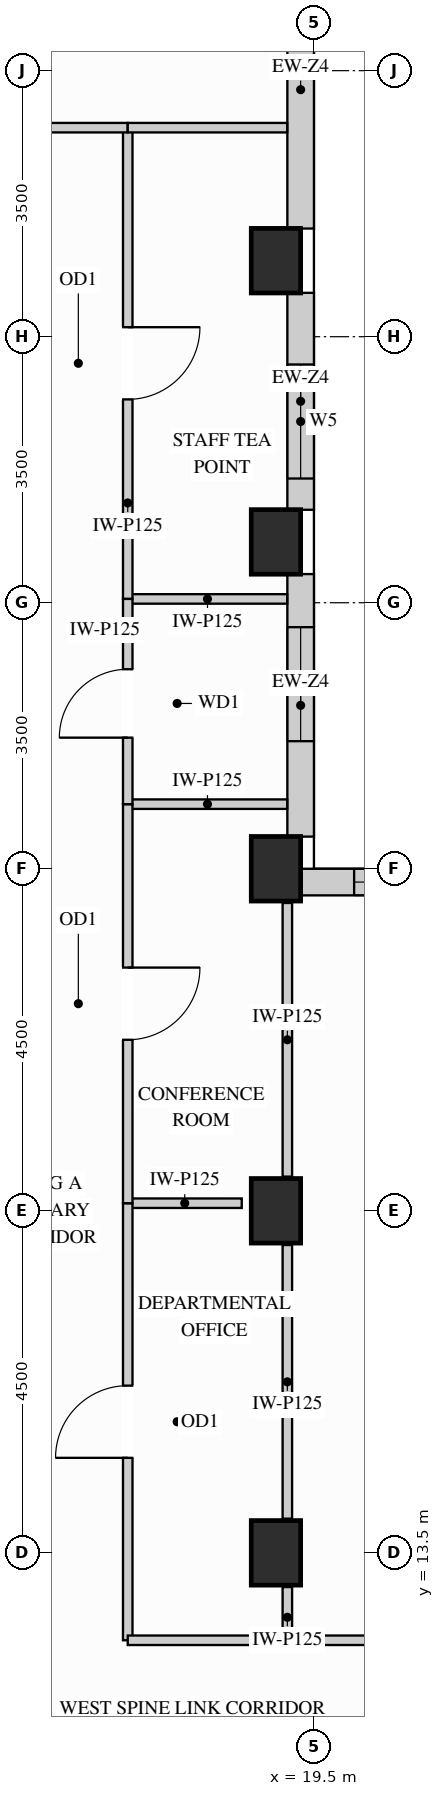
"""IFC4 building model, lengths in metres.
Left out: names, types, materials, properties, quantities, classifications, styles, units other than length and angle.
Written with IfcOpenShell. Run it as: python <this file> out.ifc"""

import sys

from ifc_helpers import new_model, si_unit, direction, frame, frame_2d, origin, origin_2d, place, context, subcontext, project, spatial, rectangle, extrude, source, transform, mapped, element, fill, save


model = new_model("IFC4")
c1 = context("Model", 3, precision=1e-05, world=origin(), true_north=direction((0.0, 1.0)))
c2 = subcontext(c1, "Body", "Model", "MODEL_VIEW")
j1 = project(units=[si_unit("LENGTHUNIT", "METRE"), si_unit("PLANEANGLEUNIT", "RADIAN")], contexts=[c1])
p1 = place(None, origin())
s1 = spatial("IfcSite", under=j1, at=p1, CompositionType="ELEMENT")
p2 = place(p1, origin())
s2 = spatial("IfcBuilding", under=s1, at=p2, CompositionType="ELEMENT")
p3 = place(p2, frame((0.0, 0.0, 259.2)))
s3 = spatial("IfcBuildingStorey", under=s2, at=p3, CompositionType="ELEMENT", Elevation=259.2)
m1 = source(origin(), c2, "Body", "SweptSolid", [
    extrude(rectangle(XDim=0.65, YDim=0.85, at=origin_2d()), origin(), (0.0, 0.0, 1.0), 3.4),
])
for number, where, z_axis, x_axis in (
    (1, (19.0, 13.5, 0.0), (0.0, 0.0, 1.0), (1.0, 0.0, 0.0)),
    (2, (19.0, 18.0, 0.0), (0.0, 0.0, 1.0), (1.0, 0.0, 0.0)),
    (3, (19.0, 22.5, 0.0), (0.0, 0.0, 1.0), (1.0, 0.0, 0.0)),
    (4, (19.0, 26.8, 0.0), (0.0, 0.0, 1.0), (1.0, 0.0, 0.0)),
    (5, (19.0, 30.5, 0.0), (0.0, 0.0, 1.0), (1.0, 0.0, 0.0)),
):
    element("IfcColumn", number, at=place(p3, frame(where, z_axis=z_axis, x_axis=x_axis)), inside=s3, PredefinedType="COLUMN", context=c2, shape_type="MappedRepresentation", body=[
        mapped(m1, transform((0.0, 0.0, 0.0), x_axis=(1.0, 0.0, 0.0), y_axis=(0.0, 1.0, 0.0), z_axis=(0.0, 0.0, 1.0))),
    ])
p4 = place(p3, frame((34.4, 22.325, 0.0), z_axis=(0.0, 0.0, 1.0), x_axis=(-1.0, 0.0, 0.0)))
e6 = element("IfcWall", 6, at=p4, inside=s3, PredefinedType="SOLIDWALL", context=c2, shape_type="SweptSolid", body=[
    extrude(rectangle(XDim=15.077, YDim=0.35, at=frame_2d((7.539, 0.0))), origin(), (0.0, 0.0, 1.0), 3.385),
])
p5 = place(p4, frame((0.647, 0.0, 0.78)))
e7 = element("IfcOpeningElement", 7, at=p5, cuts=e6, PredefinedType="OPENING", context=c2, shape_type="SweptSolid", body=[
    extrude(rectangle(XDim=1.5, YDim=2.0, at=frame_2d((0.75, 1.0))), frame((0.0, 0.185, 0.0), z_axis=(0.0, -1.0, 0.0), x_axis=(1.0, 0.0, 0.0)), (0.0, 0.0, 1.0), 0.37),
])
p6 = place(p4, frame((2.473, 0.0, 0.78)))
e8 = element("IfcOpeningElement", 8, at=p6, cuts=e6, PredefinedType="OPENING", context=c2, shape_type="SweptSolid", body=[
    extrude(rectangle(XDim=1.5, YDim=2.0, at=frame_2d((0.75, 1.0))), frame((0.0, 0.185, 0.0), z_axis=(0.0, -1.0, 0.0), x_axis=(1.0, 0.0, 0.0)), (0.0, 0.0, 1.0), 0.37),
])
p7 = place(p4, frame((5.567, 0.0, 0.78)))
e9 = element("IfcOpeningElement", 9, at=p7, cuts=e6, PredefinedType="OPENING", context=c2, shape_type="SweptSolid", body=[
    extrude(rectangle(XDim=1.5, YDim=2.0, at=frame_2d((0.75, 1.0))), frame((0.0, 0.185, 0.0), z_axis=(0.0, -1.0, 0.0), x_axis=(1.0, 0.0, 0.0)), (0.0, 0.0, 1.0), 0.37),
])
p8 = place(p4, frame((7.833, 0.0, 0.78)))
e10 = element("IfcOpeningElement", 10, at=p8, cuts=e6, PredefinedType="OPENING", context=c2, shape_type="SweptSolid", body=[
    extrude(rectangle(XDim=1.5, YDim=2.0, at=frame_2d((0.75, 1.0))), frame((0.0, 0.185, 0.0), z_axis=(0.0, -1.0, 0.0), x_axis=(1.0, 0.0, 0.0)), (0.0, 0.0, 1.0), 0.37),
])
p9 = place(p4, frame((10.986, 0.0, 0.78)))
e11 = element("IfcOpeningElement", 11, at=p9, cuts=e6, PredefinedType="OPENING", context=c2, shape_type="SweptSolid", body=[
    extrude(rectangle(XDim=1.5, YDim=2.0, at=frame_2d((0.75, 1.0))), frame((0.0, 0.185, 0.0), z_axis=(0.0, -1.0, 0.0), x_axis=(1.0, 0.0, 0.0)), (0.0, 0.0, 1.0), 0.37),
])
p10 = place(p4, frame((12.871, 0.0, 0.78)))
e12 = element("IfcOpeningElement", 12, at=p10, cuts=e6, PredefinedType="OPENING", context=c2, shape_type="SweptSolid", body=[
    extrude(rectangle(XDim=1.5, YDim=2.0, at=frame_2d((0.75, 1.0))), frame((0.0, 0.185, 0.0), z_axis=(0.0, -1.0, 0.0), x_axis=(1.0, 0.0, 0.0)), (0.0, 0.0, 1.0), 0.37),
])
p11 = place(p3, frame((19.325, 22.923, 0.0), z_axis=(0.0, 0.0, 1.0), x_axis=(0.0, 1.0, 0.0)))
e13 = element("IfcWall", 13, at=p11, inside=s3, PredefinedType="SOLIDWALL", context=c2, shape_type="SweptSolid", body=[
    extrude(rectangle(XDim=3.454, YDim=0.35, at=frame_2d((1.727, 0.0))), origin(), (0.0, 0.0, 1.0), 2.619),
])
p12 = place(p11, frame((1.256, 0.0, 0.78)))
e14 = element("IfcOpeningElement", 14, at=p12, cuts=e13, PredefinedType="OPENING", context=c2, shape_type="SweptSolid", body=[
    extrude(rectangle(XDim=1.5, YDim=1.659, at=frame_2d((0.75, 0.83))), frame((0.0, 0.185, 0.0), z_axis=(0.0, -1.0, 0.0), x_axis=(1.0, 0.0, 0.0)), (0.0, 0.0, 1.0), 0.37),
])
p13 = place(p3, frame((19.325, 27.223, 0.0), z_axis=(0.0, 0.0, 1.0), x_axis=(0.0, 1.0, 0.0)))
e15 = element("IfcWall", 15, at=p13, inside=s3, PredefinedType="SOLIDWALL", context=c2, shape_type="SweptSolid", body=[
    extrude(rectangle(XDim=2.854, YDim=0.35, at=frame_2d((1.427, 0.0))), origin(), (0.0, 0.0, 1.0), 2.619),
])
p14 = place(p13, frame((0.411, 0.0, 0.78)))
e16 = element("IfcOpeningElement", 16, at=p14, cuts=e15, PredefinedType="OPENING", context=c2, shape_type="SweptSolid", body=[
    extrude(rectangle(XDim=1.5, YDim=1.659, at=frame_2d((0.75, 0.83))), frame((0.0, 0.185, 0.0), z_axis=(0.0, -1.0, 0.0), x_axis=(1.0, 0.0, 0.0)), (0.0, 0.0, 1.0), 0.37),
])
m2 = source(origin(), c2, "Body", "SweptSolid", [
    extrude(rectangle(XDim=3.654, YDim=0.35, at=frame_2d((1.827, 0.0))), origin(), (0.0, 0.0, 1.0), 2.619),
])
p15 = place(p3, frame((19.325, 30.923, 0.0), z_axis=(0.0, 0.0, 1.0), x_axis=(0.0, 1.0, 0.0)))
e17 = element("IfcWall", 17, at=p15, inside=s3, PredefinedType="SOLIDWALL", context=c2, shape_type="MappedRepresentation", body=[
    mapped(m2, transform((0.0, 0.0, 0.0), x_axis=(1.0, 0.0, 0.0), y_axis=(0.0, 1.0, 0.0), z_axis=(0.0, 0.0, 1.0))),
])
m3 = source(origin(), c2, "Body", "SweptSolid", [
    extrude(rectangle(XDim=1.5, YDim=0.125, at=frame_2d((0.75, 0.0))), origin(), (0.0, 0.0, 1.0), 2.773),
])
p16 = place(p3, frame((17.05, 18.1, 0.0), z_axis=(0.0, 0.0, 1.0), x_axis=(1.0, 0.0, 0.0)))
e18 = element("IfcWall", 18, at=p16, inside=s3, PredefinedType="PARTITIONING", context=c2, shape_type="MappedRepresentation", body=[
    mapped(m3, transform((0.0, 0.0, 0.0), x_axis=(1.0, 0.0, 0.0), y_axis=(0.0, 1.0, 0.0), z_axis=(0.0, 0.0, 1.0))),
])
m4 = source(origin(), c2, "Body", "SweptSolid", [
    extrude(rectangle(XDim=2.098, YDim=0.125, at=frame_2d((1.049, 0.0))), origin(), (0.0, 0.0, 1.0), 3.385),
])
for number, where, z_axis, x_axis in (
    (19, (17.05, 23.35, 0.0), (0.0, 0.0, 1.0), (1.0, 0.0, 0.0)),
    (20, (17.05, 26.05, 0.0), (0.0, 0.0, 1.0), (1.0, 0.0, 0.0)),
):
    element("IfcWall", number, at=place(p3, frame(where, z_axis=z_axis, x_axis=x_axis)), inside=s3, PredefinedType="PARTITIONING", context=c2, shape_type="MappedRepresentation", body=[
        mapped(m4, transform((0.0, 0.0, 0.0), x_axis=(1.0, 0.0, 0.0), y_axis=(0.0, 1.0, 0.0), z_axis=(0.0, 0.0, 1.0))),
    ])
m5 = source(origin(), c2, "Body", "SweptSolid", [
    extrude(rectangle(XDim=0.7, YDim=0.125, at=frame_2d((0.35, 0.0))), origin(), (0.0, 0.0, 1.0), 2.773),
])
p17 = place(p3, frame((19.15, 12.35, 0.0), z_axis=(0.0, 0.0, 1.0), x_axis=(0.0, 1.0, 0.0)))
e21 = element("IfcWall", 21, at=p17, inside=s3, PredefinedType="PARTITIONING", context=c2, shape_type="MappedRepresentation", body=[
    mapped(m5, transform((0.0, 0.0, 0.0), x_axis=(1.0, 0.0, 0.0), y_axis=(0.0, 1.0, 0.0), z_axis=(0.0, 0.0, 1.0))),
])
m6 = source(origin(), c2, "Body", "SweptSolid", [
    extrude(rectangle(XDim=3.6, YDim=0.125, at=frame_2d((1.8, 0.0))), origin(), (0.0, 0.0, 1.0), 2.773),
])
for number, where, z_axis, x_axis in (
    (22, (19.15, 13.95, 0.0), (0.0, 0.0, 1.0), (0.0, 1.0, 0.0)),
    (23, (19.15, 18.45, 0.0), (0.0, 0.0, 1.0), (0.0, 1.0, 0.0)),
):
    element("IfcWall", number, at=place(p3, frame(where, z_axis=z_axis, x_axis=x_axis)), inside=s3, PredefinedType="PARTITIONING", context=c2, shape_type="MappedRepresentation", body=[
        mapped(m6, transform((0.0, 0.0, 0.0), x_axis=(1.0, 0.0, 0.0), y_axis=(0.0, 1.0, 0.0), z_axis=(0.0, 0.0, 1.0))),
    ])
p18 = place(p3, frame((17.05, 12.35, 0.0), z_axis=(0.0, 0.0, 1.0), x_axis=(0.0, 1.0, 0.0)))
e24 = element("IfcWall", 24, at=p18, inside=s3, PredefinedType="PARTITIONING", context=c2, shape_type="SweptSolid", body=[
    extrude(rectangle(XDim=5.75, YDim=0.125, at=frame_2d((2.875, 0.0))), origin(), (0.0, 0.0, 1.0), 3.385),
])
p19 = place(p18, frame((2.4, 0.0, 0.0)))
e25 = element("IfcOpeningElement", 25, at=p19, cuts=e24, PredefinedType="OPENING", context=c2, shape_type="SweptSolid", body=[
    extrude(rectangle(XDim=0.95, YDim=2.15, at=frame_2d((0.475, 1.075))), frame((0.0, 0.073, 0.0), z_axis=(0.0, -1.0, 0.0), x_axis=(1.0, 0.0, 0.0)), (0.0, 0.0, 1.0), 0.145),
])
p20 = place(p3, frame((17.05, 18.1, 0.0), z_axis=(0.0, 0.0, 1.0), x_axis=(0.0, 1.0, 0.0)))
e26 = element("IfcWall", 26, at=p20, inside=s3, PredefinedType="PARTITIONING", context=c2, shape_type="SweptSolid", body=[
    extrude(rectangle(XDim=5.25, YDim=0.125, at=frame_2d((2.625, 0.0))), origin(), (0.0, 0.0, 1.0), 3.385),
])
p21 = place(p20, frame((2.15, 0.0, 0.0)))
e27 = element("IfcOpeningElement", 27, at=p21, cuts=e26, PredefinedType="OPENING", context=c2, shape_type="SweptSolid", body=[
    extrude(rectangle(XDim=0.95, YDim=2.15, at=frame_2d((0.475, 1.075))), frame((0.0, 0.073, 0.0), z_axis=(0.0, -1.0, 0.0), x_axis=(1.0, 0.0, 0.0)), (0.0, 0.0, 1.0), 0.145),
])
p22 = place(p3, frame((17.05, 26.05, 0.0), z_axis=(0.0, 0.0, 1.0), x_axis=(0.0, 1.0, 0.0)))
e28 = element("IfcWall", 28, at=p22, inside=s3, PredefinedType="PARTITIONING", context=c2, shape_type="SweptSolid", body=[
    extrude(rectangle(XDim=6.2, YDim=0.125, at=frame_2d((3.1, 0.0))), origin(), (0.0, 0.0, 1.0), 3.385),
])
p23 = place(p22, frame((2.625, 0.0, 0.0)))
e29 = element("IfcOpeningElement", 29, at=p23, cuts=e28, PredefinedType="OPENING", context=c2, shape_type="SweptSolid", body=[
    extrude(rectangle(XDim=0.95, YDim=2.15, at=frame_2d((0.475, 1.075))), frame((0.0, 0.073, 0.0), z_axis=(0.0, -1.0, 0.0), x_axis=(1.0, 0.0, 0.0)), (0.0, 0.0, 1.0), 0.145),
])
p24 = place(p3, frame((17.05, 23.35, 0.0), z_axis=(0.0, 0.0, 1.0), x_axis=(0.0, 1.0, 0.0)))
e30 = element("IfcWall", 30, at=p24, inside=s3, PredefinedType="PARTITIONING", context=c2, shape_type="SweptSolid", body=[
    extrude(rectangle(XDim=2.7, YDim=0.125, at=frame_2d((1.35, 0.0))), origin(), (0.0, 0.0, 1.0), 3.385),
])
p25 = place(p24, frame((0.875, 0.0, 0.0)))
e31 = element("IfcOpeningElement", 31, at=p25, cuts=e30, PredefinedType="OPENING", context=c2, shape_type="SweptSolid", body=[
    extrude(rectangle(XDim=0.9, YDim=2.15, at=frame_2d((0.45, 1.075))), frame((0.0, 0.073, 0.0), z_axis=(0.0, -1.0, 0.0), x_axis=(1.0, 0.0, 0.0)), (0.0, 0.0, 1.0), 0.145),
])
p26 = place(p3, frame((11.916, 32.25, 0.0), z_axis=(0.0, 0.0, 1.0), x_axis=(1.0, 0.0, 0.0)))
e32 = element("IfcWall", 32, at=p26, inside=s3, PredefinedType="PARTITIONING", context=c2, shape_type="SweptSolid", body=[
    extrude(rectangle(XDim=5.134, YDim=0.125, at=frame_2d((2.567, 0.0))), origin(), (0.0, 0.0, 1.0), 3.385),
])
p27 = place(p26, frame((2.092, 0.0, 0.0)))
e33 = element("IfcOpeningElement", 33, at=p27, cuts=e32, PredefinedType="OPENING", context=c2, shape_type="SweptSolid", body=[
    extrude(rectangle(XDim=0.95, YDim=2.15, at=frame_2d((0.475, 1.075))), frame((0.0, 0.073, 0.0), z_axis=(0.0, -1.0, 0.0), x_axis=(1.0, 0.0, 0.0)), (0.0, 0.0, 1.0), 0.145),
])
p28 = place(p3, frame((17.05, 32.25, 0.0), z_axis=(0.0, 0.0, 1.0), x_axis=(1.0, 0.0, 0.0)))
e34 = element("IfcWall", 34, at=p28, inside=s3, PredefinedType="PARTITIONING", context=c2, shape_type="MappedRepresentation", body=[
    mapped(m4, transform((0.0, 0.0, 0.0), x_axis=(1.0, 0.0, 0.0), y_axis=(0.0, 1.0, 0.0), z_axis=(0.0, 0.0, 1.0))),
])
m7 = source(origin(), c2, "Body", "SweptSolid", [
    extrude(rectangle(XDim=2.45, YDim=0.125, at=frame_2d((1.225, 0.0))), origin(), (0.0, 0.0, 1.0), 3.385),
])
p29 = place(p3, frame((17.05, 12.35, 0.0), z_axis=(0.0, 0.0, 1.0), x_axis=(1.0, 0.0, 0.0)))
e35 = element("IfcWall", 35, at=p29, inside=s3, PredefinedType="PARTITIONING", context=c2, shape_type="MappedRepresentation", body=[
    mapped(m7, transform((0.0, 0.0, 0.0), x_axis=(1.0, 0.0, 0.0), y_axis=(0.0, 1.0, 0.0), z_axis=(0.0, 0.0, 1.0))),
])
p30 = place(p3, frame((19.5, 12.35, 0.0), z_axis=(0.0, 0.0, 1.0), x_axis=(1.0, 0.0, 0.0)))
e36 = element("IfcWall", 36, at=p30, inside=s3, PredefinedType="PARTITIONING", context=c2, shape_type="SweptSolid", body=[
    extrude(rectangle(XDim=4.55, YDim=0.125, at=frame_2d((2.275, 0.0))), origin(), (0.0, 0.0, 1.0), 3.385),
])
p31 = place(p30, frame((1.8, 0.0, 0.0)))
e37 = element("IfcOpeningElement", 37, at=p31, cuts=e36, PredefinedType="OPENING", context=c2, shape_type="SweptSolid", body=[
    extrude(rectangle(XDim=0.95, YDim=2.15, at=frame_2d((0.475, 1.075))), frame((0.0, 0.073, 0.0), z_axis=(0.0, -1.0, 0.0), x_axis=(1.0, 0.0, 0.0)), (0.0, 0.0, 1.0), 0.145),
])
m8 = source(origin(), c2, "Body", "SweptSolid", [
    extrude(rectangle(XDim=0.95, YDim=2.15, at=frame_2d((0.475, 1.075))), frame((0.0, 0.025, 0.0), z_axis=(0.0, -1.0, 0.0), x_axis=(1.0, 0.0, 0.0)), (0.0, 0.0, 1.0), 0.05),
])
p32 = place(p19, origin())
e38 = element("IfcDoor", 38, at=p32, inside=s3, OperationType="SINGLE_SWING_LEFT", PredefinedType="DOOR", context=c2, shape_type="MappedRepresentation", body=[
    mapped(m8, transform((0.0, 0.0, 0.0), x_axis=(1.0, 0.0, 0.0), y_axis=(0.0, 1.0, 0.0), z_axis=(0.0, 0.0, 1.0))),
])
fill(e25, e38)
p33 = place(p21, origin())
e39 = element("IfcDoor", 39, at=p33, inside=s3, OperationType="SINGLE_SWING_RIGHT", PredefinedType="DOOR", context=c2, shape_type="MappedRepresentation", body=[
    mapped(m8, transform((0.0, 0.0, 0.0), x_axis=(1.0, 0.0, 0.0), y_axis=(0.0, 1.0, 0.0), z_axis=(0.0, 0.0, 1.0))),
])
fill(e27, e39)
p34 = place(p23, origin())
e40 = element("IfcDoor", 40, at=p34, inside=s3, OperationType="SINGLE_SWING_RIGHT", PredefinedType="DOOR", context=c2, shape_type="MappedRepresentation", body=[
    mapped(m8, transform((0.0, 0.0, 0.0), x_axis=(1.0, 0.0, 0.0), y_axis=(0.0, 1.0, 0.0), z_axis=(0.0, 0.0, 1.0))),
])
fill(e29, e40)
m9 = source(origin(), c2, "Body", "SweptSolid", [
    extrude(rectangle(XDim=0.9, YDim=2.15, at=frame_2d((0.45, 1.075))), frame((0.0, 0.025, 0.0), z_axis=(0.0, -1.0, 0.0), x_axis=(1.0, 0.0, 0.0)), (0.0, 0.0, 1.0), 0.05),
])
p35 = place(p25, origin())
e41 = element("IfcDoor", 41, at=p35, inside=s3, OperationType="SINGLE_SWING_LEFT", PredefinedType="DOOR", context=c2, shape_type="MappedRepresentation", body=[
    mapped(m9, transform((0.0, 0.0, 0.0), x_axis=(1.0, 0.0, 0.0), y_axis=(0.0, 1.0, 0.0), z_axis=(0.0, 0.0, 1.0))),
])
fill(e31, e41)
m10 = source(origin(), c2, "Body", "SweptSolid", [
    extrude(rectangle(XDim=1.5, YDim=2.0, at=frame_2d((0.75, 1.0))), frame((0.0, 0.03, 0.0), z_axis=(0.0, -1.0, 0.0), x_axis=(1.0, 0.0, 0.0)), (0.0, 0.0, 1.0), 0.06),
])
p36 = place(p10, origin())
e42 = element("IfcWindow", 42, at=p36, inside=s3, PartitioningType="SINGLE_PANEL", PredefinedType="WINDOW", context=c2, shape_type="MappedRepresentation", body=[
    mapped(m10, transform((0.0, 0.0, 0.0), x_axis=(1.0, 0.0, 0.0), y_axis=(0.0, 1.0, 0.0), z_axis=(0.0, 0.0, 1.0))),
])
fill(e12, e42)
m11 = source(origin(), c2, "Body", "SweptSolid", [
    extrude(rectangle(XDim=1.5, YDim=1.659, at=frame_2d((0.75, 0.83))), frame((0.0, 0.03, 0.0), z_axis=(0.0, -1.0, 0.0), x_axis=(1.0, 0.0, 0.0)), (0.0, 0.0, 1.0), 0.06),
])
p37 = place(p12, origin())
e43 = element("IfcWindow", 43, at=p37, inside=s3, PartitioningType="SINGLE_PANEL", PredefinedType="WINDOW", context=c2, shape_type="MappedRepresentation", body=[
    mapped(m11, transform((0.0, 0.0, 0.0), x_axis=(1.0, 0.0, 0.0), y_axis=(0.0, 1.0, 0.0), z_axis=(0.0, 0.0, 1.0))),
])
fill(e14, e43)
p38 = place(p14, origin())
e44 = element("IfcWindow", 44, at=p38, inside=s3, PartitioningType="SINGLE_PANEL", PredefinedType="WINDOW", context=c2, shape_type="MappedRepresentation", body=[
    mapped(m11, transform((0.0, 0.0, 0.0), x_axis=(1.0, 0.0, 0.0), y_axis=(0.0, 1.0, 0.0), z_axis=(0.0, 0.0, 1.0))),
])
fill(e16, e44)
save(model, sys.argv[1])
